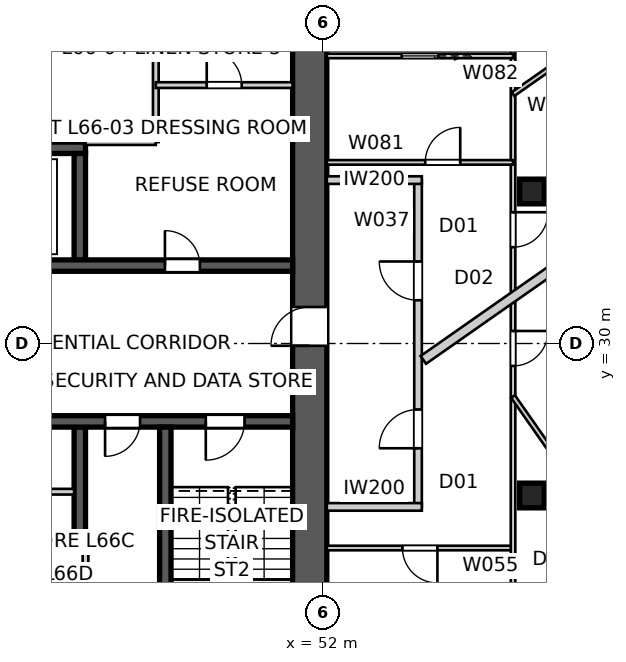
"""IFC4 building model, lengths in metres.
Left out: names, types, materials, properties, quantities, classifications, styles, units other than length and angle.
Written with IfcOpenShell. Run it as: python <this file> out.ifc"""

import sys

from ifc_helpers import new_model, si_unit, direction, frame, frame_2d, origin, origin_2d, place, context, subcontext, project, spatial, polyline, rectangle, outline, extrude, element, fill, save


model = new_model("IFC4")
c1 = context("Model", 3, precision=1e-05, world=origin(), true_north=direction((0.0, 1.0)))
c2 = subcontext(c1, "Body", "Model", "MODEL_VIEW")
j1 = project(units=[si_unit("LENGTHUNIT", "METRE"), si_unit("PLANEANGLEUNIT", "RADIAN")], contexts=[c1])
p1 = place(None, origin())
s1 = spatial("IfcSite", under=j1, at=p1, CompositionType="ELEMENT")
p2 = place(p1, origin())
s2 = spatial("IfcBuilding", under=s1, at=p2, CompositionType="ELEMENT")
p3 = place(p2, frame((0.0, 0.0, 240.4)))
s3 = spatial("IfcBuildingStorey", under=s2, at=p3, CompositionType="ELEMENT", Elevation=240.4)
p4 = place(p3, frame((51.65, 18.8, 0.0), z_axis=(0.0, 0.0, 1.0), x_axis=(0.0, 1.0, 0.0)))
e1 = element("IfcWall", 1, at=p4, inside=s3, PredefinedType="SHEAR", context=c2, shape_type="SweptSolid", body=[
    extrude(outline(polyline([(0.0, -0.45), (22.4, -0.45), (22.4, -0.025), (22.85, -0.025), (22.85, 0.025), (22.4, 0.025), (22.4, 0.45), (0.0, 0.45), (0.0, 0.025), (-0.45, 0.025), (-0.45, -0.025), (0.0, -0.025), (0.0, -0.45)])), origin(), (0.0, 0.0, 1.0), 3.4),
])
p5 = place(p4, frame((11.14, 0.0, 0.0)))
e2 = element("IfcOpeningElement", 2, at=p5, cuts=e1, PredefinedType="OPENING", context=c2, shape_type="SweptSolid", body=[
    extrude(rectangle(XDim=1.02, YDim=2.4, at=frame_2d((0.51, 1.2))), frame((0.0, 0.46, 0.0), z_axis=(0.0, -1.0, 0.0), x_axis=(1.0, 0.0, 0.0)), (0.0, 0.0, 1.0), 0.92),
])
p6 = place(p3, frame((28.8, 32.05, 0.0), z_axis=(0.0, 0.0, 1.0), x_axis=(1.0, 0.0, 0.0)))
e3 = element("IfcWall", 3, at=p6, inside=s3, PredefinedType="SHEAR", context=c2, shape_type="SweptSolid", body=[
    extrude(rectangle(XDim=22.4, YDim=0.3, at=frame_2d((11.2, 0.0))), origin(), (0.0, 0.0, 1.0), 3.4),
])
p7 = place(p6, frame((19.04, 0.0, 0.0)))
e4 = element("IfcOpeningElement", 4, at=p7, cuts=e3, PredefinedType="OPENING", context=c2, shape_type="SweptSolid", body=[
    extrude(rectangle(XDim=0.92, YDim=2.1, at=frame_2d((0.46, 1.05))), frame((0.0, 0.16, 0.0), z_axis=(0.0, -1.0, 0.0), x_axis=(1.0, 0.0, 0.0)), (0.0, 0.0, 1.0), 0.32),
])
p8 = place(p6, frame((1.265, 0.0, 0.0)))
e5 = element("IfcOpeningElement", 5, at=p8, cuts=e3, PredefinedType="OPENING", context=c2, shape_type="SweptSolid", body=[
    extrude(rectangle(XDim=1.02, YDim=2.1, at=frame_2d((0.51, 1.05))), frame((0.0, 0.16, 0.0), z_axis=(0.0, -1.0, 0.0), x_axis=(1.0, 0.0, 0.0)), (0.0, 0.0, 1.0), 0.32),
])
p9 = place(p6, frame((4.015, 0.0, 0.0)))
e6 = element("IfcOpeningElement", 6, at=p9, cuts=e3, PredefinedType="OPENING", context=c2, shape_type="SweptSolid", body=[
    extrude(rectangle(XDim=0.92, YDim=2.1, at=frame_2d((0.46, 1.05))), frame((0.0, 0.16, 0.0), z_axis=(0.0, -1.0, 0.0), x_axis=(1.0, 0.0, 0.0)), (0.0, 0.0, 1.0), 0.32),
])
p10 = place(p6, frame((6.565, 0.0, 0.0)))
e7 = element("IfcOpeningElement", 7, at=p10, cuts=e3, PredefinedType="OPENING", context=c2, shape_type="SweptSolid", body=[
    extrude(rectangle(XDim=0.92, YDim=2.1, at=frame_2d((0.46, 1.05))), frame((0.0, 0.16, 0.0), z_axis=(0.0, -1.0, 0.0), x_axis=(1.0, 0.0, 0.0)), (0.0, 0.0, 1.0), 0.32),
])
p11 = place(p6, frame((8.89, 0.0, 0.0)))
e8 = element("IfcOpeningElement", 8, at=p11, cuts=e3, PredefinedType="OPENING", context=c2, shape_type="SweptSolid", body=[
    extrude(rectangle(XDim=0.92, YDim=2.1, at=frame_2d((0.46, 1.05))), frame((0.0, 0.16, 0.0), z_axis=(0.0, -1.0, 0.0), x_axis=(1.0, 0.0, 0.0)), (0.0, 0.0, 1.0), 0.32),
])
p12 = place(p6, frame((12.05, 0.0, 0.0)))
e9 = element("IfcOpeningElement", 9, at=p12, cuts=e3, PredefinedType="OPENING", context=c2, shape_type="SweptSolid", body=[
    extrude(rectangle(XDim=1.1, YDim=2.1, at=frame_2d((0.55, 1.05))), frame((0.0, 0.16, 0.0), z_axis=(0.0, -1.0, 0.0), x_axis=(1.0, 0.0, 0.0)), (0.0, 0.0, 1.0), 0.32),
])
p13 = place(p6, frame((14.85, 0.0, 0.0)))
e10 = element("IfcOpeningElement", 10, at=p13, cuts=e3, PredefinedType="OPENING", context=c2, shape_type="SweptSolid", body=[
    extrude(rectangle(XDim=1.1, YDim=2.1, at=frame_2d((0.55, 1.05))), frame((0.0, 0.16, 0.0), z_axis=(0.0, -1.0, 0.0), x_axis=(1.0, 0.0, 0.0)), (0.0, 0.0, 1.0), 0.32),
])
p14 = place(p3, frame((51.2, 27.95, 0.0), z_axis=(0.0, 0.0, 1.0), x_axis=(-1.0, 0.0, 0.0)))
e11 = element("IfcWall", 11, at=p14, inside=s3, PredefinedType="SHEAR", context=c2, shape_type="SweptSolid", body=[
    extrude(rectangle(XDim=22.4, YDim=0.3, at=frame_2d((11.2, 0.0))), origin(), (0.0, 0.0, 1.0), 3.4),
])
p15 = place(p14, frame((19.04, 0.0, 0.0)))
e12 = element("IfcOpeningElement", 12, at=p15, cuts=e11, PredefinedType="OPENING", context=c2, shape_type="SweptSolid", body=[
    extrude(rectangle(XDim=0.92, YDim=2.1, at=frame_2d((0.46, 1.05))), frame((0.0, 0.16, 0.0), z_axis=(0.0, -1.0, 0.0), x_axis=(1.0, 0.0, 0.0)), (0.0, 0.0, 1.0), 0.32),
])
p16 = place(p14, frame((1.265, 0.0, 0.0)))
e13 = element("IfcOpeningElement", 13, at=p16, cuts=e11, PredefinedType="OPENING", context=c2, shape_type="SweptSolid", body=[
    extrude(rectangle(XDim=1.02, YDim=2.1, at=frame_2d((0.51, 1.05))), frame((0.0, 0.16, 0.0), z_axis=(0.0, -1.0, 0.0), x_axis=(1.0, 0.0, 0.0)), (0.0, 0.0, 1.0), 0.32),
])
p17 = place(p14, frame((4.015, 0.0, 0.0)))
e14 = element("IfcOpeningElement", 14, at=p17, cuts=e11, PredefinedType="OPENING", context=c2, shape_type="SweptSolid", body=[
    extrude(rectangle(XDim=0.92, YDim=2.1, at=frame_2d((0.46, 1.05))), frame((0.0, 0.16, 0.0), z_axis=(0.0, -1.0, 0.0), x_axis=(1.0, 0.0, 0.0)), (0.0, 0.0, 1.0), 0.32),
])
p18 = place(p14, frame((8.89, 0.0, 0.0)))
e15 = element("IfcOpeningElement", 15, at=p18, cuts=e11, PredefinedType="OPENING", context=c2, shape_type="SweptSolid", body=[
    extrude(rectangle(XDim=0.92, YDim=2.1, at=frame_2d((0.46, 1.05))), frame((0.0, 0.16, 0.0), z_axis=(0.0, -1.0, 0.0), x_axis=(1.0, 0.0, 0.0)), (0.0, 0.0, 1.0), 0.32),
])
p19 = place(p14, frame((6.565, 0.0, 0.0)))
e16 = element("IfcOpeningElement", 16, at=p19, cuts=e11, PredefinedType="OPENING", context=c2, shape_type="SweptSolid", body=[
    extrude(rectangle(XDim=0.92, YDim=2.1, at=frame_2d((0.46, 1.05))), frame((0.0, 0.16, 0.0), z_axis=(0.0, -1.0, 0.0), x_axis=(1.0, 0.0, 0.0)), (0.0, 0.0, 1.0), 0.32),
])
p20 = place(p14, frame((12.05, 0.0, 0.0)))
e17 = element("IfcOpeningElement", 17, at=p20, cuts=e11, PredefinedType="OPENING", context=c2, shape_type="SweptSolid", body=[
    extrude(rectangle(XDim=1.1, YDim=2.1, at=frame_2d((0.55, 1.05))), frame((0.0, 0.16, 0.0), z_axis=(0.0, -1.0, 0.0), x_axis=(1.0, 0.0, 0.0)), (0.0, 0.0, 1.0), 0.32),
])
p21 = place(p14, frame((14.85, 0.0, 0.0)))
e18 = element("IfcOpeningElement", 18, at=p21, cuts=e11, PredefinedType="OPENING", context=c2, shape_type="SweptSolid", body=[
    extrude(rectangle(XDim=1.1, YDim=2.1, at=frame_2d((0.55, 1.05))), frame((0.0, 0.16, 0.0), z_axis=(0.0, -1.0, 0.0), x_axis=(1.0, 0.0, 0.0)), (0.0, 0.0, 1.0), 0.32),
])
for number, where, z_axis, x_axis in (
    (19, (34.25, 35.15, 0.0), (0.0, 0.0, 1.0), (1.0, 0.0, 0.0)),
    (20, (45.75, 24.85, 0.0), (0.0, 0.0, 1.0), (-1.0, 0.0, 0.0)),
):
    element("IfcWall", number, at=place(p3, frame(where, z_axis=z_axis, x_axis=x_axis)), inside=s3, PredefinedType="SHEAR", context=c2, shape_type="SweptSolid", body=[
        extrude(rectangle(XDim=11.5, YDim=0.3, at=frame_2d((5.75, 0.0))), origin(), (0.0, 0.0, 1.0), 3.4),
    ])
for number, where, z_axis, x_axis in (
    (21, (45.6, 27.8, 0.0), (0.0, 0.0, 1.0), (0.0, -1.0, 0.0)),
    (22, (45.6, 32.2, 0.0), (0.0, 0.0, 1.0), (0.0, 1.0, 0.0)),
):
    element("IfcWall", number, at=place(p3, frame(where, z_axis=z_axis, x_axis=x_axis)), inside=s3, PredefinedType="SHEAR", context=c2, shape_type="SweptSolid", body=[
        extrude(rectangle(XDim=2.8, YDim=0.3, at=frame_2d((1.4, 0.0))), origin(), (0.0, 0.0, 1.0), 3.4),
    ])
p22 = place(p3, frame((47.85, 27.8, 0.0), z_axis=(0.0, 0.0, 1.0), x_axis=(0.0, -1.0, 0.0)))
e23 = element("IfcWall", 23, at=p22, inside=s3, PredefinedType="SHEAR", context=c2, shape_type="SweptSolid", body=[
    extrude(rectangle(XDim=7.7, YDim=0.3, at=frame_2d((3.85, 0.0))), origin(), (0.0, 0.0, 1.0), 3.4),
])
for number, where, z_axis, x_axis in (
    (24, (57.5, 26.0, 0.0), (0.0, 0.0, 1.0), (1.0, 0.0, 0.0)),
    (25, (57.5, 34.0, 0.0), (0.0, 0.0, 1.0), (1.0, 0.0, 0.0)),
):
    element("IfcColumn", number, at=place(p3, frame(where, z_axis=z_axis, x_axis=x_axis)), inside=s3, PredefinedType="COLUMN", context=c2, shape_type="SweptSolid", body=[
        extrude(rectangle(XDim=0.65, YDim=0.65, at=origin_2d()), origin(), (0.0, 0.0, 1.0), 3.4),
    ])
p23 = place(p3, frame((54.5, 25.7, 0.0), z_axis=(0.0, 0.0, 1.0), x_axis=(0.0, 1.0, 0.0)))
e26 = element("IfcWall", 26, at=p23, inside=s3, PredefinedType="PARTITIONING", context=c2, shape_type="SweptSolid", body=[
    extrude(rectangle(XDim=8.6, YDim=0.2, at=frame_2d((4.3, 0.0))), origin(), (0.0, 0.0, 1.0), 3.25),
])
p24 = place(p23, frame((5.438, 0.0, 0.0)))
e27 = element("IfcOpeningElement", 27, at=p24, cuts=e26, PredefinedType="OPENING", context=c2, shape_type="SweptSolid", body=[
    extrude(rectangle(XDim=1.02, YDim=2.34, at=frame_2d((0.51, 1.17))), frame((0.0, 0.11, 0.0), z_axis=(0.0, -1.0, 0.0), x_axis=(1.0, 0.0, 0.0)), (0.0, 0.0, 1.0), 0.22),
])
p25 = place(p23, frame((1.543, 0.0, 0.0)))
e28 = element("IfcOpeningElement", 28, at=p25, cuts=e26, PredefinedType="OPENING", context=c2, shape_type="SweptSolid", body=[
    extrude(rectangle(XDim=1.02, YDim=2.34, at=frame_2d((0.51, 1.17))), frame((0.0, 0.11, 0.0), z_axis=(0.0, -1.0, 0.0), x_axis=(1.0, 0.0, 0.0)), (0.0, 0.0, 1.0), 0.22),
])
for number, where, z_axis, x_axis in (
    (29, (52.1, 34.3, 0.0), (0.0, 0.0, 1.0), (1.0, 0.0, 0.0)),
    (30, (52.1, 25.7, 0.0), (0.0, 0.0, 1.0), (1.0, 0.0, 0.0)),
):
    element("IfcWall", number, at=place(p3, frame(where, z_axis=z_axis, x_axis=x_axis)), inside=s3, PredefinedType="PARTITIONING", context=c2, shape_type="SweptSolid", body=[
        extrude(rectangle(XDim=2.5, YDim=0.2, at=frame_2d((1.25, 0.0))), origin(), (0.0, 0.0, 1.0), 3.25),
    ])
p26 = place(p3, frame((62.631, 35.164, 0.0), z_axis=(0.0, 0.0, 1.0), x_axis=(-0.81915902312, -0.573566469418, 0.0)))
e31 = element("IfcWall", 31, at=p26, inside=s3, PredefinedType="PARTITIONING", context=c2, shape_type="SweptSolid", body=[
    extrude(rectangle(XDim=9.756, YDim=0.25, at=frame_2d((4.878, 0.0))), origin(), (0.0, 0.0, 1.0), 3.25),
])
p27 = place(p3, frame((47.6, 41.2, 0.0), z_axis=(0.0, 0.0, 1.0), x_axis=(0.0, -1.0, 0.0)))
e32 = element("IfcWall", 32, at=p27, inside=s3, PredefinedType="SOLIDWALL", context=c2, shape_type="SweptSolid", body=[
    extrude(rectangle(XDim=5.9, YDim=0.15, at=frame_2d((2.95, 0.0))), origin(), (0.0, 0.0, 1.0), 3.25),
])
p28 = place(p3, frame((47.6, 35.3, 0.0), z_axis=(0.0, 0.0, 1.0), x_axis=(-1.0, 0.0, 0.0)))
e33 = element("IfcWall", 33, at=p28, inside=s3, PredefinedType="SOLIDWALL", context=c2, shape_type="SweptSolid", body=[
    extrude(rectangle(XDim=1.85, YDim=0.15, at=frame_2d((0.925, 0.0))), origin(), (0.0, 0.0, 1.0), 3.25),
])
p29 = place(p3, frame((47.6, 36.8, 0.0), z_axis=(0.0, 0.0, 1.0), x_axis=(1.0, 0.0, 0.0)))
e34 = element("IfcWall", 34, at=p29, inside=s3, PredefinedType="SOLIDWALL", context=c2, shape_type="SweptSolid", body=[
    extrude(rectangle(XDim=3.6, YDim=0.15, at=frame_2d((1.8, 0.0))), origin(), (0.0, 0.0, 1.0), 3.25),
])
p30 = place(p29, frame((1.34, 0.0, 0.0)))
e35 = element("IfcOpeningElement", 35, at=p30, cuts=e34, PredefinedType="OPENING", context=c2, shape_type="SweptSolid", body=[
    extrude(rectangle(XDim=0.92, YDim=2.1, at=frame_2d((0.46, 1.05))), frame((0.0, 0.085, 0.0), z_axis=(0.0, -1.0, 0.0), x_axis=(1.0, 0.0, 0.0)), (0.0, 0.0, 1.0), 0.17),
])
p31 = place(p3, frame((45.75, 18.8, 0.0), z_axis=(0.0, 0.0, 1.0), x_axis=(0.0, 1.0, 0.0)))
e36 = element("IfcWall", 36, at=p31, inside=s3, PredefinedType="SOLIDWALL", context=c2, shape_type="SweptSolid", body=[
    extrude(rectangle(XDim=5.95, YDim=0.15, at=frame_2d((2.975, 0.0))), origin(), (0.0, 0.0, 1.0), 3.25),
])
p32 = place(p31, frame((2.515, 0.0, 0.0)))
e37 = element("IfcOpeningElement", 37, at=p32, cuts=e36, PredefinedType="OPENING", context=c2, shape_type="SweptSolid", body=[
    extrude(rectangle(XDim=0.92, YDim=2.1, at=frame_2d((0.46, 1.05))), frame((0.0, 0.085, 0.0), z_axis=(0.0, -1.0, 0.0), x_axis=(1.0, 0.0, 0.0)), (0.0, 0.0, 1.0), 0.17),
])
p33 = place(p3, frame((57.0, 24.618, 0.0), z_axis=(0.0, 0.0, 1.0), x_axis=(-1.0, 0.0, 0.0)))
e38 = element("IfcWall", 38, at=p33, inside=s3, PredefinedType="PARTITIONING", context=c2, shape_type="SweptSolid", body=[
    extrude(rectangle(XDim=4.9, YDim=0.12, at=frame_2d((2.45, 0.0))), origin(), (0.0, 0.0, 1.0), 3.25),
])
p34 = place(p33, frame((1.99, 0.0, 0.0)))
e39 = element("IfcOpeningElement", 39, at=p34, cuts=e38, PredefinedType="OPENING", context=c2, shape_type="SweptSolid", body=[
    extrude(rectangle(XDim=0.92, YDim=2.34, at=frame_2d((0.46, 1.17))), frame((0.0, 0.07, 0.0), z_axis=(0.0, -1.0, 0.0), x_axis=(1.0, 0.0, 0.0)), (0.0, 0.0, 1.0), 0.14),
])
p35 = place(p3, frame((57.0, 41.904, 0.0), z_axis=(0.0, 0.0, 1.0), x_axis=(0.0, -1.0, 0.0)))
e40 = element("IfcWall", 40, at=p35, inside=s3, PredefinedType="PARTITIONING", context=c2, shape_type="SweptSolid", body=[
    extrude(rectangle(XDim=20.498, YDim=0.12, at=frame_2d((10.249, 0.0))), origin(), (0.0, 0.0, 1.0), 2.55),
])
p36 = place(p35, frame((8.449, 0.0, 0.0)))
e41 = element("IfcOpeningElement", 41, at=p36, cuts=e40, PredefinedType="OPENING", context=c2, shape_type="SweptSolid", body=[
    extrude(rectangle(XDim=0.92, YDim=2.34, at=frame_2d((0.46, 1.17))), frame((0.0, 0.07, 0.0), z_axis=(0.0, -1.0, 0.0), x_axis=(1.0, 0.0, 0.0)), (0.0, 0.0, 1.0), 0.14),
])
p37 = place(p35, frame((11.574, 0.0, 0.0)))
e42 = element("IfcOpeningElement", 42, at=p37, cuts=e40, PredefinedType="OPENING", context=c2, shape_type="SweptSolid", body=[
    extrude(rectangle(XDim=0.92, YDim=2.34, at=frame_2d((0.46, 1.17))), frame((0.0, 0.07, 0.0), z_axis=(0.0, -1.0, 0.0), x_axis=(1.0, 0.0, 0.0)), (0.0, 0.0, 1.0), 0.14),
])
p38 = place(p35, frame((18.432, 0.0, 0.0)))
e43 = element("IfcOpeningElement", 43, at=p38, cuts=e40, PredefinedType="OPENING", context=c2, shape_type="SweptSolid", body=[
    extrude(rectangle(XDim=0.92, YDim=2.34, at=frame_2d((0.46, 1.17))), frame((0.0, 0.07, 0.0), z_axis=(0.0, -1.0, 0.0), x_axis=(1.0, 0.0, 0.0)), (0.0, 0.0, 1.0), 0.14),
])
p39 = place(p3, frame((57.0, 28.604, 0.0), z_axis=(0.0, 0.0, 1.0), x_axis=(0.573575545802, -0.819152667857, 0.0)))
e44 = element("IfcWall", 44, at=p39, inside=s3, PredefinedType="PARTITIONING", context=c2, shape_type="SweptSolid", body=[
    extrude(rectangle(XDim=10.566, YDim=0.12, at=frame_2d((5.283, 0.0))), origin(), (0.0, 0.0, 1.0), 3.25),
])
p40 = place(p39, frame((8.121, 0.0, 0.0)))
e45 = element("IfcOpeningElement", 45, at=p40, cuts=e44, PredefinedType="OPENING", context=c2, shape_type="SweptSolid", body=[
    extrude(rectangle(XDim=0.92, YDim=2.34, at=frame_2d((0.46, 1.17))), frame((0.0, 0.07, 0.0), z_axis=(0.0, -1.0, 0.0), x_axis=(1.0, 0.0, 0.0)), (0.0, 0.0, 1.0), 0.14),
])
p41 = place(p3, frame((52.1, 34.766, 0.0), z_axis=(0.0, 0.0, 1.0), x_axis=(1.0, 0.0, 0.0)))
e46 = element("IfcWall", 46, at=p41, inside=s3, PredefinedType="PARTITIONING", context=c2, shape_type="SweptSolid", body=[
    extrude(rectangle(XDim=4.9, YDim=0.12, at=frame_2d((2.45, 0.0))), origin(), (0.0, 0.0, 1.0), 3.25),
])
p42 = place(p41, frame((2.59, 0.0, 0.0)))
e47 = element("IfcOpeningElement", 47, at=p42, cuts=e46, PredefinedType="OPENING", context=c2, shape_type="SweptSolid", body=[
    extrude(rectangle(XDim=0.92, YDim=2.34, at=frame_2d((0.46, 1.17))), frame((0.0, 0.07, 0.0), z_axis=(0.0, -1.0, 0.0), x_axis=(1.0, 0.0, 0.0)), (0.0, 0.0, 1.0), 0.14),
])
p43 = place(p3, frame((57.0, 37.568, 0.0), z_axis=(0.0, 0.0, 1.0), x_axis=(-1.0, 0.0, 0.0)))
e48 = element("IfcWall", 48, at=p43, inside=s3, PredefinedType="PARTITIONING", context=c2, shape_type="SweptSolid", body=[
    extrude(rectangle(XDim=4.9, YDim=0.12, at=frame_2d((2.45, 0.0))), origin(), (0.0, 0.0, 1.0), 3.25),
])
p44 = place(p43, frame((1.97, 0.0, 0.0)))
e49 = element("IfcOpeningElement", 49, at=p44, cuts=e48, PredefinedType="OPENING", context=c2, shape_type="SweptSolid", body=[
    extrude(rectangle(XDim=0.96, YDim=2.1, at=frame_2d((0.48, 1.05))), frame((0.0, 0.07, 0.0), z_axis=(0.0, -1.0, 0.0), x_axis=(1.0, 0.0, 0.0)), (0.0, 0.0, 1.0), 0.14),
])
p45 = place(p3, frame((57.0, 36.562, 0.0), z_axis=(0.0, 0.0, 1.0), x_axis=(0.819140645834, 0.573592714688, 0.0)))
e50 = element("IfcWall", 50, at=p45, inside=s3, PredefinedType="PARTITIONING", context=c2, shape_type="SweptSolid", body=[
    extrude(rectangle(XDim=3.77, YDim=0.12, at=frame_2d((1.885, 0.0))), origin(), (0.0, 0.0, 1.0), 3.25),
])
p46 = place(p45, frame((1.445, 0.0, 0.0)))
e51 = element("IfcOpeningElement", 51, at=p46, cuts=e50, PredefinedType="OPENING", context=c2, shape_type="SweptSolid", body=[
    extrude(rectangle(XDim=0.92, YDim=2.34, at=frame_2d((0.46, 1.17))), frame((0.0, 0.07, 0.0), z_axis=(0.0, -1.0, 0.0), x_axis=(1.0, 0.0, 0.0)), (0.0, 0.0, 1.0), 0.14),
])
p47 = place(p3, frame((40.1, 26.1, 0.0), z_axis=(0.0, 0.0, 1.0), x_axis=(1.0, 0.0, 0.0)))
e52 = element("IfcWall", 52, at=p47, inside=s3, PredefinedType="SOLIDWALL", context=c2, shape_type="SweptSolid", body=[
    extrude(rectangle(XDim=5.35, YDim=0.15, at=frame_2d((2.675, 0.0))), origin(), (0.0, 0.0, 1.0), 3.25),
])
p48 = place(p47, frame((2.215, 0.0, 0.0)))
e53 = element("IfcOpeningElement", 53, at=p48, cuts=e52, PredefinedType="OPENING", context=c2, shape_type="SweptSolid", body=[
    extrude(rectangle(XDim=0.92, YDim=2.1, at=frame_2d((0.46, 1.05))), frame((0.0, 0.085, 0.0), z_axis=(0.0, -1.0, 0.0), x_axis=(1.0, 0.0, 0.0)), (0.0, 0.0, 1.0), 0.17),
])
p49 = place(p7, origin())
e54 = element("IfcDoor", 54, at=p49, inside=s3, OperationType="SINGLE_SWING_LEFT", PredefinedType="DOOR", context=c2, shape_type="SweptSolid", body=[
    extrude(rectangle(XDim=0.92, YDim=2.1, at=frame_2d((0.46, 1.05))), frame((0.0, 0.025, 0.0), z_axis=(0.0, -1.0, 0.0), x_axis=(1.0, 0.0, 0.0)), (0.0, 0.0, 1.0), 0.05),
])
fill(e4, e54)
p50 = place(p16, origin())
e55 = element("IfcDoor", 55, at=p50, inside=s3, OperationType="SINGLE_SWING_RIGHT", PredefinedType="DOOR", context=c2, shape_type="SweptSolid", body=[
    extrude(rectangle(XDim=1.02, YDim=2.1, at=frame_2d((0.51, 1.05))), frame((0.0, 0.025, 0.0), z_axis=(0.0, -1.0, 0.0), x_axis=(1.0, 0.0, 0.0)), (0.0, 0.0, 1.0), 0.05),
])
fill(e13, e55)
p51 = place(p17, origin())
e56 = element("IfcDoor", 56, at=p51, inside=s3, OperationType="SINGLE_SWING_RIGHT", PredefinedType="DOOR", context=c2, shape_type="SweptSolid", body=[
    extrude(rectangle(XDim=0.92, YDim=2.1, at=frame_2d((0.46, 1.05))), frame((0.0, 0.025, 0.0), z_axis=(0.0, -1.0, 0.0), x_axis=(1.0, 0.0, 0.0)), (0.0, 0.0, 1.0), 0.05),
])
fill(e14, e56)
p52 = place(p24, origin())
e57 = element("IfcDoor", 57, at=p52, inside=s3, OperationType="SINGLE_SWING_RIGHT", PredefinedType="DOOR", context=c2, shape_type="SweptSolid", body=[
    extrude(rectangle(XDim=1.02, YDim=2.34, at=frame_2d((0.51, 1.17))), frame((0.0, 0.025, 0.0), z_axis=(0.0, -1.0, 0.0), x_axis=(1.0, 0.0, 0.0)), (0.0, 0.0, 1.0), 0.05),
])
fill(e27, e57)
p53 = place(p25, origin())
e58 = element("IfcDoor", 58, at=p53, inside=s3, OperationType="SINGLE_SWING_LEFT", PredefinedType="DOOR", context=c2, shape_type="SweptSolid", body=[
    extrude(rectangle(XDim=1.02, YDim=2.34, at=frame_2d((0.51, 1.17))), frame((0.0, 0.025, 0.0), z_axis=(0.0, -1.0, 0.0), x_axis=(1.0, 0.0, 0.0)), (0.0, 0.0, 1.0), 0.05),
])
fill(e28, e58)
p54 = place(p30, origin())
e59 = element("IfcDoor", 59, at=p54, inside=s3, OperationType="SINGLE_SWING_LEFT", PredefinedType="DOOR", context=c2, shape_type="SweptSolid", body=[
    extrude(rectangle(XDim=0.92, YDim=2.1, at=frame_2d((0.46, 1.05))), frame((0.0, 0.025, 0.0), z_axis=(0.0, -1.0, 0.0), x_axis=(1.0, 0.0, 0.0)), (0.0, 0.0, 1.0), 0.05),
])
fill(e35, e59)
p55 = place(p42, origin())
e60 = element("IfcDoor", 60, at=p55, inside=s3, OperationType="SINGLE_SWING_RIGHT", PredefinedType="DOOR", context=c2, shape_type="SweptSolid", body=[
    extrude(rectangle(XDim=0.92, YDim=2.34, at=frame_2d((0.46, 1.17))), frame((0.0, 0.025, 0.0), z_axis=(0.0, -1.0, 0.0), x_axis=(1.0, 0.0, 0.0)), (0.0, 0.0, 1.0), 0.05),
])
fill(e47, e60)
p56 = place(p36, origin())
e61 = element("IfcDoor", 61, at=p56, inside=s3, OperationType="SINGLE_SWING_LEFT", PredefinedType="DOOR", context=c2, shape_type="SweptSolid", body=[
    extrude(rectangle(XDim=0.92, YDim=2.34, at=frame_2d((0.46, 1.17))), frame((0.0, 0.025, 0.0), z_axis=(0.0, -1.0, 0.0), x_axis=(1.0, 0.0, 0.0)), (0.0, 0.0, 1.0), 0.05),
])
fill(e41, e61)
p57 = place(p34, origin())
e62 = element("IfcDoor", 62, at=p57, inside=s3, OperationType="SINGLE_SWING_LEFT", PredefinedType="DOOR", context=c2, shape_type="SweptSolid", body=[
    extrude(rectangle(XDim=0.92, YDim=2.34, at=frame_2d((0.46, 1.17))), frame((0.0, 0.025, 0.0), z_axis=(0.0, -1.0, 0.0), x_axis=(1.0, 0.0, 0.0)), (0.0, 0.0, 1.0), 0.05),
])
fill(e39, e62)
p58 = place(p37, origin())
e63 = element("IfcDoor", 63, at=p58, inside=s3, OperationType="SINGLE_SWING_LEFT", PredefinedType="DOOR", context=c2, shape_type="SweptSolid", body=[
    extrude(rectangle(XDim=0.92, YDim=2.34, at=frame_2d((0.46, 1.17))), frame((0.0, 0.025, 0.0), z_axis=(0.0, -1.0, 0.0), x_axis=(1.0, 0.0, 0.0)), (0.0, 0.0, 1.0), 0.05),
])
fill(e42, e63)
p59 = place(p44, origin())
e64 = element("IfcDoor", 64, at=p59, inside=s3, OperationType="SLIDING_TO_LEFT", PredefinedType="DOOR", context=c2, shape_type="SweptSolid", body=[
    extrude(rectangle(XDim=0.96, YDim=2.1, at=frame_2d((0.48, 1.05))), frame((0.0, 0.025, 0.0), z_axis=(0.0, -1.0, 0.0), x_axis=(1.0, 0.0, 0.0)), (0.0, 0.0, 1.0), 0.05),
])
fill(e49, e64)
p60 = place(p5, origin())
e65 = element("IfcDoor", 65, at=p60, inside=s3, OperationType="SINGLE_SWING_LEFT", PredefinedType="DOOR", context=c2, shape_type="SweptSolid", body=[
    extrude(rectangle(XDim=1.02, YDim=2.4, at=frame_2d((0.51, 1.2))), frame((0.0, 0.025, 0.0), z_axis=(0.0, -1.0, 0.0), x_axis=(1.0, 0.0, 0.0)), (0.0, 0.0, 1.0), 0.05),
])
fill(e2, e65)
save(model, sys.argv[1])
